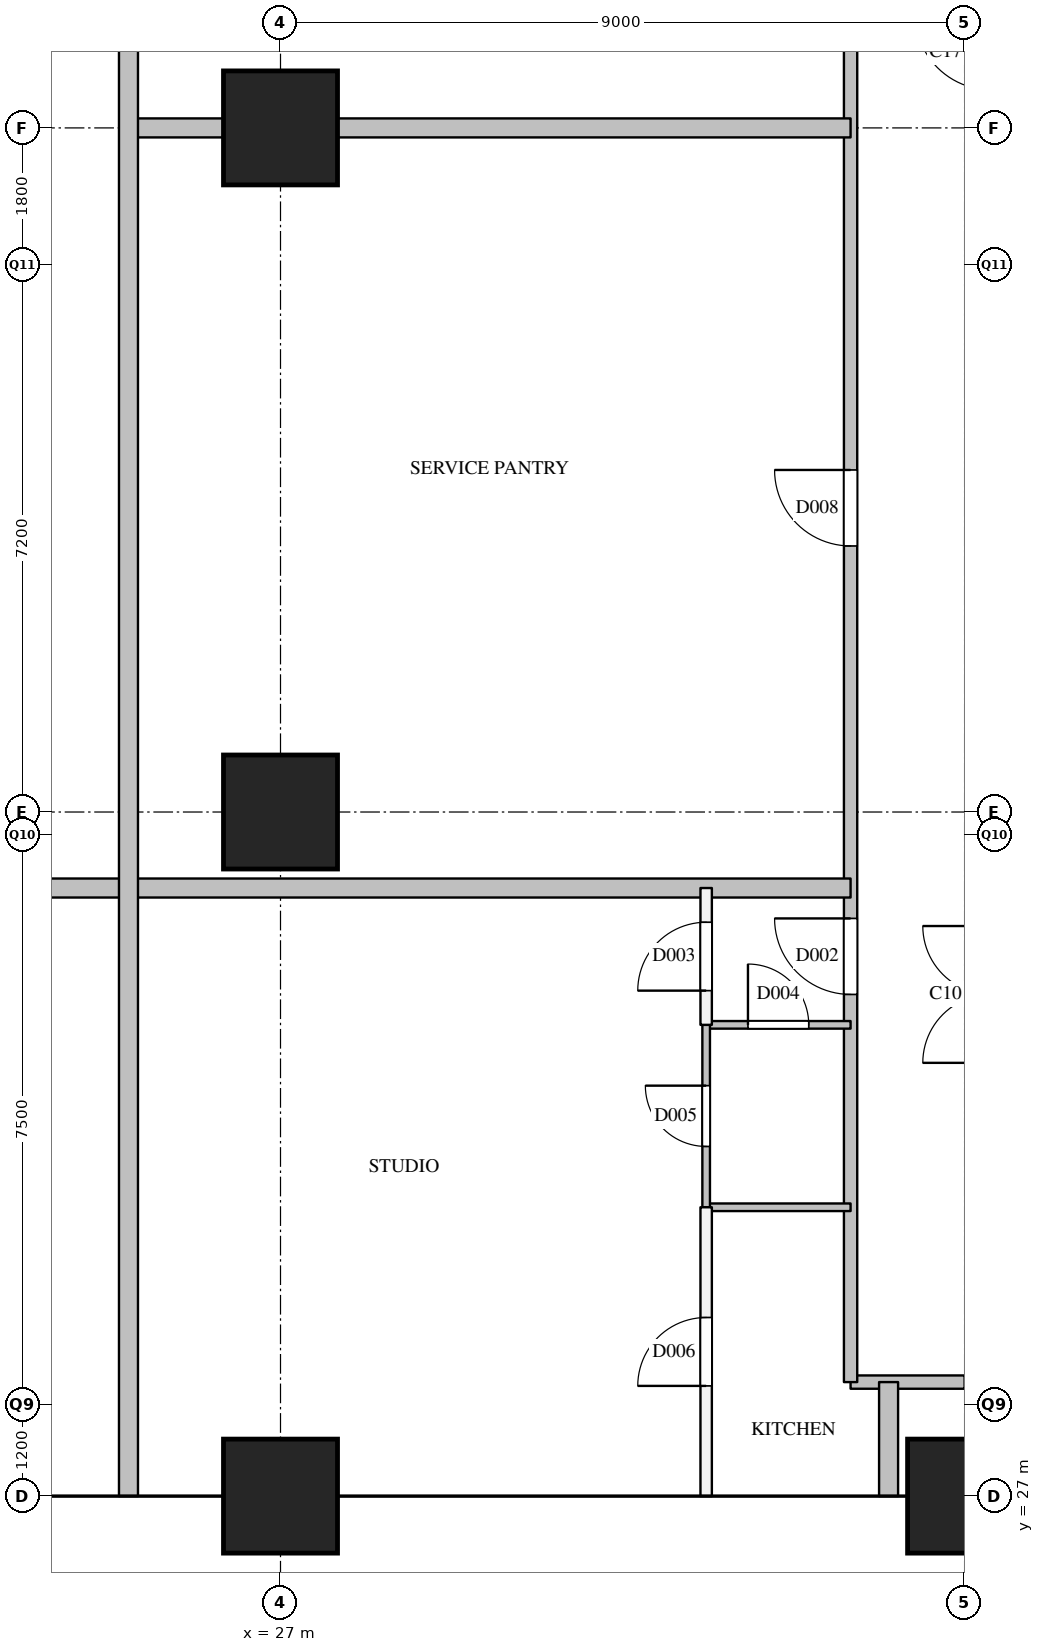
"""IFC4 building model, lengths in metres.
Left out: names, types, materials, properties, quantities, classifications, styles, units other than length and angle.
Written with IfcOpenShell. Run it as: python <this file> out.ifc"""

import sys

from ifc_helpers import new_model, si_unit, direction, frame, frame_2d, origin, origin_2d, place, context, subcontext, project, spatial, rectangle, extrude, element, fill, save


model = new_model("IFC4")
c1 = context("Model", 3, precision=1e-05, world=origin(), true_north=direction((0.0, 1.0)))
c2 = subcontext(c1, "Body", "Model", "MODEL_VIEW")
j1 = project(units=[si_unit("LENGTHUNIT", "METRE"), si_unit("PLANEANGLEUNIT", "RADIAN")], contexts=[c1])
p1 = place(None, origin())
s1 = spatial("IfcSite", under=j1, at=p1, CompositionType="ELEMENT")
p2 = place(p1, origin())
s2 = spatial("IfcBuilding", under=s1, at=p2, CompositionType="ELEMENT")
p3 = place(p2, frame((0.0, 0.0, 177.8)))
s3 = spatial("IfcBuildingStorey", under=s2, at=p3, CompositionType="ELEMENT", Elevation=177.8)
for number, where, z_axis, x_axis in (
    (1, (27.0, 27.0, 0.0), (0.0, 0.0, 1.0), (1.0, 0.0, 0.0)),
    (2, (27.0, 36.0, 0.0), (0.0, 0.0, 1.0), (1.0, 0.0, 0.0)),
    (3, (27.0, 45.0, 0.0), (0.0, 0.0, 1.0), (1.0, 0.0, 0.0)),
    (4, (36.0, 27.0, 0.0), (0.0, 0.0, 1.0), (1.0, 0.0, 0.0)),
):
    element("IfcColumn", number, at=place(p3, frame(where, z_axis=z_axis, x_axis=x_axis)), inside=s3, PredefinedType="COLUMN", context=c2, shape_type="SweptSolid", body=[
        extrude(rectangle(XDim=1.5, YDim=1.5, at=origin_2d()), origin(), (0.0, 0.0, 1.0), 3.9),
    ])
p4 = place(p3, frame((34.5, 28.5, 0.0), z_axis=(0.0, 0.0, 1.0), x_axis=(1.0, 0.0, 0.0)))
e5 = element("IfcWall", 5, at=p4, inside=s3, PredefinedType="PARTITIONING", context=c2, shape_type="SweptSolid", body=[
    extrude(rectangle(XDim=1.5, YDim=0.175, at=frame_2d((0.75, 0.0))), origin(), (0.0, 0.0, 1.0), 3.6),
])
p5 = place(p3, frame((34.5, 28.5, 0.0), z_axis=(0.0, 0.0, 1.0), x_axis=(0.0, 1.0, 0.0)))
e6 = element("IfcWall", 6, at=p5, inside=s3, PredefinedType="PARTITIONING", context=c2, shape_type="SweptSolid", body=[
    extrude(rectangle(XDim=23.0, YDim=0.175, at=frame_2d((11.5, 0.0))), origin(), (0.0, 0.0, 1.0), 3.6),
])
p6 = place(p5, frame((5.1, 0.0, 0.0)))
e7 = element("IfcOpeningElement", 7, at=p6, cuts=e6, PredefinedType="OPENING", context=c2, shape_type="SweptSolid", body=[
    extrude(rectangle(XDim=1.0, YDim=2.1, at=frame_2d((0.5, 1.05))), frame((0.0, 0.097, 0.0), z_axis=(0.0, -1.0, 0.0), x_axis=(1.0, 0.0, 0.0)), (0.0, 0.0, 1.0), 0.195),
])
p7 = place(p5, frame((11.0, 0.0, 0.0)))
e8 = element("IfcOpeningElement", 8, at=p7, cuts=e6, PredefinedType="OPENING", context=c2, shape_type="SweptSolid", body=[
    extrude(rectangle(XDim=1.0, YDim=2.1, at=frame_2d((0.5, 1.05))), frame((0.0, 0.097, 0.0), z_axis=(0.0, -1.0, 0.0), x_axis=(1.0, 0.0, 0.0)), (0.0, 0.0, 1.0), 0.195),
])
p8 = place(p3, frame((32.6, 27.0, 0.0), z_axis=(0.0, 0.0, 1.0), x_axis=(0.0, 1.0, 0.0)))
e9 = element("IfcWall", 9, at=p8, inside=s3, PredefinedType="PARTITIONING", context=c2, shape_type="SweptSolid", body=[
    extrude(rectangle(XDim=3.8, YDim=0.15, at=frame_2d((1.9, 0.0))), origin(), (0.0, 0.0, 1.0), 2.6),
])
p9 = place(p8, frame((1.45, 0.0, 0.0)))
e10 = element("IfcOpeningElement", 10, at=p9, cuts=e9, PredefinedType="OPENING", context=c2, shape_type="SweptSolid", body=[
    extrude(rectangle(XDim=0.9, YDim=2.1, at=frame_2d((0.45, 1.05))), frame((0.0, 0.085, 0.0), z_axis=(0.0, -1.0, 0.0), x_axis=(1.0, 0.0, 0.0)), (0.0, 0.0, 1.0), 0.17),
])
p10 = place(p3, frame((32.6, 33.2, 0.0), z_axis=(0.0, 0.0, 1.0), x_axis=(0.0, 1.0, 0.0)))
e11 = element("IfcWall", 11, at=p10, inside=s3, PredefinedType="PARTITIONING", context=c2, shape_type="SweptSolid", body=[
    extrude(rectangle(XDim=1.8, YDim=0.15, at=frame_2d((0.9, 0.0))), origin(), (0.0, 0.0, 1.0), 3.6),
])
p11 = place(p10, frame((0.45, 0.0, 0.0)))
e12 = element("IfcOpeningElement", 12, at=p11, cuts=e11, PredefinedType="OPENING", context=c2, shape_type="SweptSolid", body=[
    extrude(rectangle(XDim=0.9, YDim=2.1, at=frame_2d((0.45, 1.05))), frame((0.0, 0.085, 0.0), z_axis=(0.0, -1.0, 0.0), x_axis=(1.0, 0.0, 0.0)), (0.0, 0.0, 1.0), 0.17),
])
p12 = place(p3, frame((19.5, 35.0, 0.0), z_axis=(0.0, 0.0, 1.0), x_axis=(1.0, 0.0, 0.0)))
e13 = element("IfcWall", 13, at=p12, inside=s3, PredefinedType="PARTITIONING", context=c2, shape_type="SweptSolid", body=[
    extrude(rectangle(XDim=15.0, YDim=0.25, at=frame_2d((7.5, 0.0))), origin(), (0.0, 0.0, 1.0), 2.6),
])
p13 = place(p3, frame((25.0, 45.0, 0.0), z_axis=(0.0, 0.0, 1.0), x_axis=(1.0, 0.0, 0.0)))
e14 = element("IfcWall", 14, at=p13, inside=s3, PredefinedType="PARTITIONING", context=c2, shape_type="SweptSolid", body=[
    extrude(rectangle(XDim=9.5, YDim=0.25, at=frame_2d((4.75, 0.0))), origin(), (0.0, 0.0, 1.0), 3.6),
])
p14 = place(p3, frame((25.0, 27.0, 0.0), z_axis=(0.0, 0.0, 1.0), x_axis=(0.0, 1.0, 0.0)))
e15 = element("IfcWall", 15, at=p14, inside=s3, PredefinedType="PARTITIONING", context=c2, shape_type="SweptSolid", body=[
    extrude(rectangle(XDim=27.0, YDim=0.25, at=frame_2d((13.5, 0.0))), origin(), (0.0, 0.0, 1.0), 2.6),
])
p15 = place(p3, frame((35.0, 27.0, 0.0), z_axis=(0.0, 0.0, 1.0), x_axis=(0.0, 1.0, 0.0)))
e16 = element("IfcWall", 16, at=p15, inside=s3, PredefinedType="PARTITIONING", context=c2, shape_type="SweptSolid", body=[
    extrude(rectangle(XDim=1.5, YDim=0.25, at=frame_2d((0.75, 0.0))), origin(), (0.0, 0.0, 1.0), 2.6),
])
p16 = place(p3, frame((32.6, 30.8, 0.0), z_axis=(0.0, 0.0, 1.0), x_axis=(1.0, 0.0, 0.0)))
e17 = element("IfcWall", 17, at=p16, inside=s3, PredefinedType="PARTITIONING", context=c2, shape_type="SweptSolid", body=[
    extrude(rectangle(XDim=1.9, YDim=0.1, at=frame_2d((0.95, 0.0))), origin(), (0.0, 0.0, 1.0), 3.6),
])
p17 = place(p3, frame((32.6, 33.2, 0.0), z_axis=(0.0, 0.0, 1.0), x_axis=(1.0, 0.0, 0.0)))
e18 = element("IfcWall", 18, at=p17, inside=s3, PredefinedType="PARTITIONING", context=c2, shape_type="SweptSolid", body=[
    extrude(rectangle(XDim=1.9, YDim=0.1, at=frame_2d((0.95, 0.0))), origin(), (0.0, 0.0, 1.0), 3.6),
])
p18 = place(p17, frame((0.55, 0.0, 0.0)))
e19 = element("IfcOpeningElement", 19, at=p18, cuts=e18, PredefinedType="OPENING", context=c2, shape_type="SweptSolid", body=[
    extrude(rectangle(XDim=0.8, YDim=2.1, at=frame_2d((0.4, 1.05))), frame((0.0, 0.06, 0.0), z_axis=(0.0, -1.0, 0.0), x_axis=(1.0, 0.0, 0.0)), (0.0, 0.0, 1.0), 0.12),
])
p19 = place(p3, frame((32.6, 30.8, 0.0), z_axis=(0.0, 0.0, 1.0), x_axis=(0.0, 1.0, 0.0)))
e20 = element("IfcWall", 20, at=p19, inside=s3, PredefinedType="PARTITIONING", context=c2, shape_type="SweptSolid", body=[
    extrude(rectangle(XDim=2.4, YDim=0.1, at=frame_2d((1.2, 0.0))), origin(), (0.0, 0.0, 1.0), 3.6),
])
p20 = place(p19, frame((0.8, 0.0, 0.0)))
e21 = element("IfcOpeningElement", 21, at=p20, cuts=e20, PredefinedType="OPENING", context=c2, shape_type="SweptSolid", body=[
    extrude(rectangle(XDim=0.8, YDim=2.1, at=frame_2d((0.4, 1.05))), frame((0.0, 0.06, 0.0), z_axis=(0.0, -1.0, 0.0), x_axis=(1.0, 0.0, 0.0)), (0.0, 0.0, 1.0), 0.12),
])
p21 = place(p6, origin())
e22 = element("IfcDoor", 22, at=p21, inside=s3, OperationType="SINGLE_SWING_RIGHT", PredefinedType="DOOR", context=c2, shape_type="SweptSolid", body=[
    extrude(rectangle(XDim=1.0, YDim=2.1, at=frame_2d((0.5, 1.05))), frame((0.0, 0.025, 0.0), z_axis=(0.0, -1.0, 0.0), x_axis=(1.0, 0.0, 0.0)), (0.0, 0.0, 1.0), 0.05),
])
fill(e7, e22)
p22 = place(p11, origin())
e23 = element("IfcDoor", 23, at=p22, inside=s3, OperationType="SINGLE_SWING_LEFT", PredefinedType="DOOR", context=c2, shape_type="SweptSolid", body=[
    extrude(rectangle(XDim=0.9, YDim=2.1, at=frame_2d((0.45, 1.05))), frame((0.0, 0.025, 0.0), z_axis=(0.0, -1.0, 0.0), x_axis=(1.0, 0.0, 0.0)), (0.0, 0.0, 1.0), 0.05),
])
fill(e12, e23)
p23 = place(p18, origin())
e24 = element("IfcDoor", 24, at=p23, inside=s3, OperationType="SINGLE_SWING_LEFT", PredefinedType="DOOR", context=c2, shape_type="SweptSolid", body=[
    extrude(rectangle(XDim=0.8, YDim=2.1, at=frame_2d((0.4, 1.05))), frame((0.0, 0.025, 0.0), z_axis=(0.0, -1.0, 0.0), x_axis=(1.0, 0.0, 0.0)), (0.0, 0.0, 1.0), 0.05),
])
fill(e19, e24)
p24 = place(p20, origin())
e25 = element("IfcDoor", 25, at=p24, inside=s3, OperationType="SINGLE_SWING_RIGHT", PredefinedType="DOOR", context=c2, shape_type="SweptSolid", body=[
    extrude(rectangle(XDim=0.8, YDim=2.1, at=frame_2d((0.4, 1.05))), frame((0.0, 0.025, 0.0), z_axis=(0.0, -1.0, 0.0), x_axis=(1.0, 0.0, 0.0)), (0.0, 0.0, 1.0), 0.05),
])
fill(e21, e25)
p25 = place(p9, origin())
e26 = element("IfcDoor", 26, at=p25, inside=s3, OperationType="SINGLE_SWING_LEFT", PredefinedType="DOOR", context=c2, shape_type="SweptSolid", body=[
    extrude(rectangle(XDim=0.9, YDim=2.1, at=frame_2d((0.45, 1.05))), frame((0.0, 0.025, 0.0), z_axis=(0.0, -1.0, 0.0), x_axis=(1.0, 0.0, 0.0)), (0.0, 0.0, 1.0), 0.05),
])
fill(e10, e26)
p26 = place(p7, origin())
e27 = element("IfcDoor", 27, at=p26, inside=s3, OperationType="SINGLE_SWING_RIGHT", PredefinedType="DOOR", context=c2, shape_type="SweptSolid", body=[
    extrude(rectangle(XDim=1.0, YDim=2.1, at=frame_2d((0.5, 1.05))), frame((0.0, 0.025, 0.0), z_axis=(0.0, -1.0, 0.0), x_axis=(1.0, 0.0, 0.0)), (0.0, 0.0, 1.0), 0.05),
])
fill(e8, e27)
save(model, sys.argv[1])
